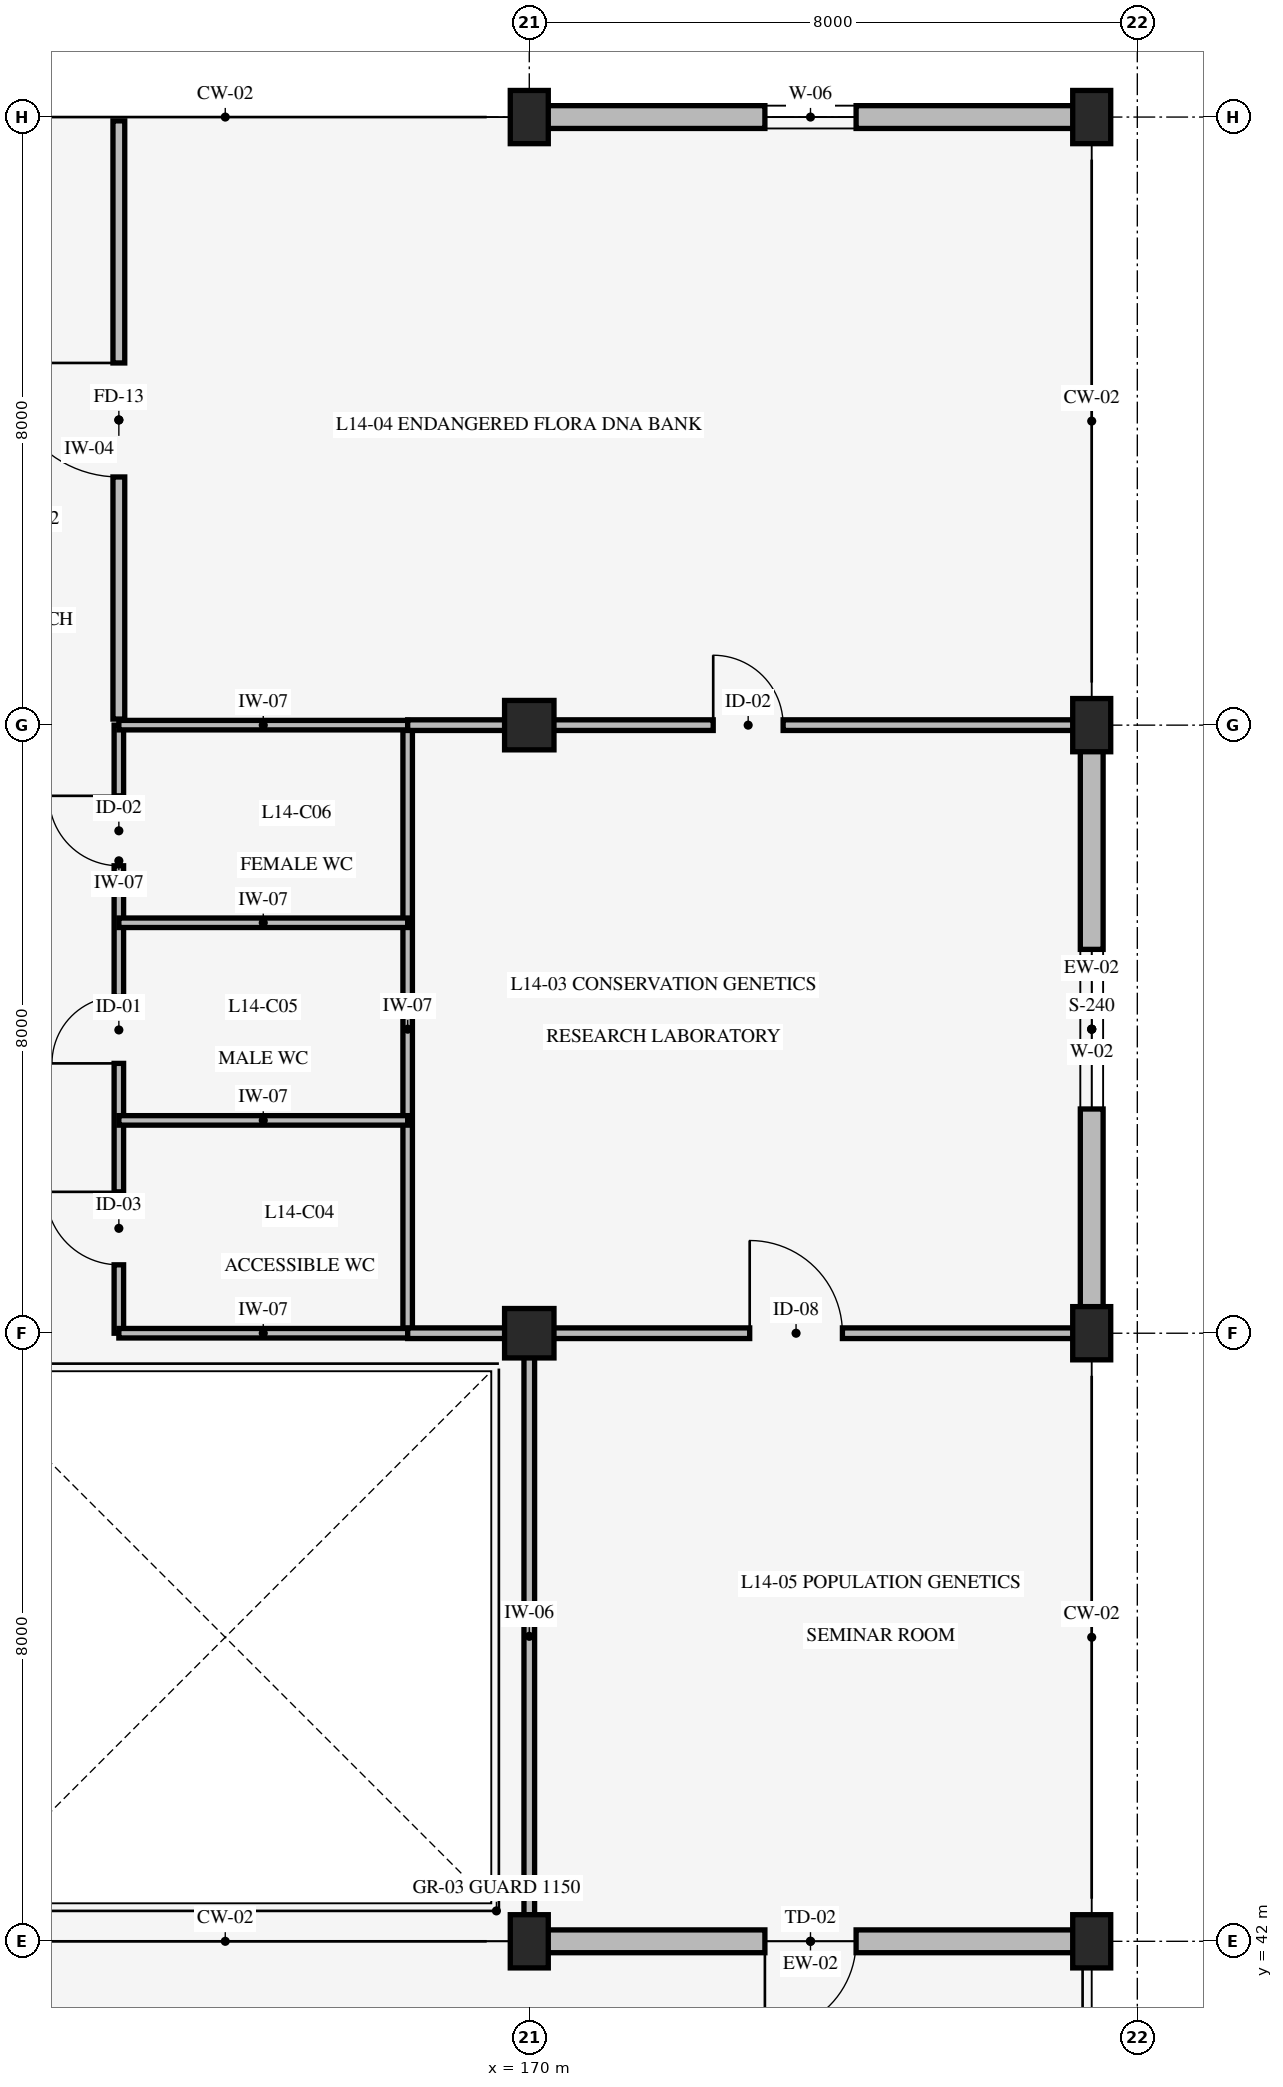
"""IFC4 building model, lengths in metres.
Left out: names, types, materials, properties, quantities, classifications, styles, units other than length and angle.
Written with IfcOpenShell. Run it as: python <this file> out.ifc"""

import sys

from ifc_helpers import new_model, si_unit, direction, frame, frame_2d, origin, origin_2d, place, context, subcontext, project, spatial, rectangle, extrude, element, fill, save


model = new_model("IFC4")
c1 = context("Model", 3, precision=1e-05, world=origin(), true_north=direction((0.0, 1.0)))
c2 = subcontext(c1, "Body", "Model", "MODEL_VIEW")
j1 = project(units=[si_unit("LENGTHUNIT", "METRE"), si_unit("PLANEANGLEUNIT", "RADIAN")], contexts=[c1])
p1 = place(None, origin())
s1 = spatial("IfcSite", under=j1, at=p1, CompositionType="ELEMENT")
p2 = place(p1, origin())
s2 = spatial("IfcBuilding", under=s1, at=p2, CompositionType="ELEMENT")
p3 = place(p2, frame((0.0, 0.0, 57.0)))
s3 = spatial("IfcBuildingStorey", under=s2, at=p3, CompositionType="ELEMENT", Elevation=57.0)
p4 = place(p3, frame((170.0, 42.0, 0.0), z_axis=(0.0, 0.0, 1.0), x_axis=(1.0, 0.0, 0.0)))
e1 = element("IfcColumn", 1, at=p4, inside=s3, PredefinedType="COLUMN", context=c2, shape_type="SweptSolid", body=[
    extrude(rectangle(XDim=0.5, YDim=0.7, at=origin_2d()), origin(), (0.0, 0.0, 1.0), 4.2),
])
for number, where, z_axis, x_axis in (
    (2, (170.0, 50.0, 0.0), (0.0, 0.0, 1.0), (1.0, 0.0, 0.0)),
    (3, (170.0, 58.0, 0.0), (0.0, 0.0, 1.0), (1.0, 0.0, 0.0)),
):
    element("IfcColumn", number, at=place(p3, frame(where, z_axis=z_axis, x_axis=x_axis)), inside=s3, PredefinedType="COLUMN", context=c2, shape_type="SweptSolid", body=[
        extrude(rectangle(XDim=0.65, YDim=0.65, at=origin_2d()), origin(), (0.0, 0.0, 1.0), 4.2),
    ])
for number, where, z_axis, x_axis in (
    (4, (170.0, 66.0, 0.0), (0.0, 0.0, 1.0), (1.0, 0.0, 0.0)),
    (5, (177.4, 42.0, 0.0), (0.0, 0.0, 1.0), (1.0, 0.0, 0.0)),
    (6, (177.4, 50.0, 0.0), (0.0, 0.0, 1.0), (1.0, 0.0, 0.0)),
    (7, (177.4, 58.0, 0.0), (0.0, 0.0, 1.0), (1.0, 0.0, 0.0)),
    (8, (177.4, 66.0, 0.0), (0.0, 0.0, 1.0), (1.0, 0.0, 0.0)),
):
    element("IfcColumn", number, at=place(p3, frame(where, z_axis=z_axis, x_axis=x_axis)), inside=s3, PredefinedType="COLUMN", context=c2, shape_type="SweptSolid", body=[
        extrude(rectangle(XDim=0.5, YDim=0.7, at=origin_2d()), origin(), (0.0, 0.0, 1.0), 4.2),
    ])
p5 = place(p3, frame((177.4, 42.0, 0.0), z_axis=(0.0, 0.0, 1.0), x_axis=(-1.0, 0.0, 0.0)))
e9 = element("IfcWall", 9, at=p5, inside=s3, PredefinedType="STANDARD", context=c2, shape_type="SweptSolid", body=[
    extrude(rectangle(XDim=7.4, YDim=0.3, at=frame_2d((3.7, 0.0))), origin(), (0.0, 0.0, 1.0), 3.29),
])
p6 = place(p5, frame((3.1, 0.0, 0.0)))
e10 = element("IfcOpeningElement", 10, at=p6, cuts=e9, PredefinedType="OPENING", context=c2, shape_type="SweptSolid", body=[
    extrude(rectangle(XDim=1.2, YDim=2.2, at=frame_2d((0.6, 1.1))), frame((0.0, 0.16, 0.0), z_axis=(0.0, -1.0, 0.0), x_axis=(1.0, 0.0, 0.0)), (0.0, 0.0, 1.0), 0.32),
])
p7 = place(p3, frame((170.0, 66.0, 0.0), z_axis=(0.0, 0.0, 1.0), x_axis=(1.0, 0.0, 0.0)))
e11 = element("IfcWall", 11, at=p7, inside=s3, PredefinedType="STANDARD", context=c2, shape_type="SweptSolid", body=[
    extrude(rectangle(XDim=7.4, YDim=0.3, at=frame_2d((3.7, 0.0))), origin(), (0.0, 0.0, 1.0), 3.29),
])
p8 = place(p7, frame((3.1, 0.0, 0.85)))
e12 = element("IfcOpeningElement", 12, at=p8, cuts=e11, PredefinedType="OPENING", context=c2, shape_type="SweptSolid", body=[
    extrude(rectangle(XDim=1.2, YDim=1.2, at=frame_2d((0.6, 0.6))), frame((0.0, 0.16, 0.0), z_axis=(0.0, -1.0, 0.0), x_axis=(1.0, 0.0, 0.0)), (0.0, 0.0, 1.0), 0.32),
])
p9 = place(p3, frame((177.4, 58.0, 0.0), z_axis=(0.0, 0.0, 1.0), x_axis=(0.0, -1.0, 0.0)))
e13 = element("IfcWall", 13, at=p9, inside=s3, PredefinedType="STANDARD", context=c2, shape_type="SweptSolid", body=[
    extrude(rectangle(XDim=8.0, YDim=0.3, at=frame_2d((4.0, 0.0))), origin(), (0.0, 0.0, 1.0), 3.34),
])
p10 = place(p9, frame((2.95, 0.0, 0.85)))
e14 = element("IfcOpeningElement", 14, at=p10, cuts=e13, PredefinedType="OPENING", context=c2, shape_type="SweptSolid", body=[
    extrude(rectangle(XDim=2.1, YDim=1.6, at=frame_2d((1.05, 0.8))), frame((0.0, 0.16, 0.0), z_axis=(0.0, -1.0, 0.0), x_axis=(1.0, 0.0, 0.0)), (0.0, 0.0, 1.0), 0.32),
])
p11 = place(p3, frame((164.6, 50.0, 0.0), z_axis=(0.0, 0.0, 1.0), x_axis=(0.0, 1.0, 0.0)))
e15 = element("IfcWall", 15, at=p11, inside=s3, PredefinedType="STANDARD", context=c2, shape_type="SweptSolid", body=[
    extrude(rectangle(XDim=8.0, YDim=0.125, at=frame_2d((4.0, 0.0))), origin(), (0.0, 0.0, 1.0), 3.9),
])
p12 = place(p11, frame((0.9, 0.0, 0.0)))
e16 = element("IfcOpeningElement", 16, at=p12, cuts=e15, PredefinedType="OPENING", context=c2, shape_type="SweptSolid", body=[
    extrude(rectangle(XDim=0.96, YDim=2.08, at=frame_2d((0.48, 1.04))), frame((0.0, 0.073, 0.0), z_axis=(0.0, -1.0, 0.0), x_axis=(1.0, 0.0, 0.0)), (0.0, 0.0, 1.0), 0.145),
])
p13 = place(p11, frame((3.55, 0.0, 0.0)))
e17 = element("IfcOpeningElement", 17, at=p13, cuts=e15, PredefinedType="OPENING", context=c2, shape_type="SweptSolid", body=[
    extrude(rectangle(XDim=0.88, YDim=2.05, at=frame_2d((0.44, 1.025))), frame((0.0, 0.073, 0.0), z_axis=(0.0, -1.0, 0.0), x_axis=(1.0, 0.0, 0.0)), (0.0, 0.0, 1.0), 0.145),
])
p14 = place(p11, frame((6.15, 0.0, 0.0)))
e18 = element("IfcOpeningElement", 18, at=p14, cuts=e15, PredefinedType="OPENING", context=c2, shape_type="SweptSolid", body=[
    extrude(rectangle(XDim=0.92, YDim=2.05, at=frame_2d((0.46, 1.025))), frame((0.0, 0.073, 0.0), z_axis=(0.0, -1.0, 0.0), x_axis=(1.0, 0.0, 0.0)), (0.0, 0.0, 1.0), 0.145),
])
p15 = place(p3, frame((168.4, 50.0, 0.0), z_axis=(0.0, 0.0, 1.0), x_axis=(0.0, 1.0, 0.0)))
e19 = element("IfcWall", 19, at=p15, inside=s3, PredefinedType="STANDARD", context=c2, shape_type="SweptSolid", body=[
    extrude(rectangle(XDim=8.0, YDim=0.125, at=frame_2d((4.0, 0.0))), origin(), (0.0, 0.0, 1.0), 3.9),
])
p16 = place(p3, frame((164.6, 50.0, 0.0), z_axis=(0.0, 0.0, 1.0), x_axis=(1.0, 0.0, 0.0)))
e20 = element("IfcWall", 20, at=p16, inside=s3, PredefinedType="STANDARD", context=c2, shape_type="SweptSolid", body=[
    extrude(rectangle(XDim=3.8, YDim=0.125, at=frame_2d((1.9, 0.0))), origin(), (0.0, 0.0, 1.0), 3.29),
])
for number, where, z_axis, x_axis in (
    (21, (164.6, 52.8, 0.0), (0.0, 0.0, 1.0), (1.0, 0.0, 0.0)),
    (22, (164.6, 55.4, 0.0), (0.0, 0.0, 1.0), (1.0, 0.0, 0.0)),
):
    element("IfcWall", number, at=place(p3, frame(where, z_axis=z_axis, x_axis=x_axis)), inside=s3, PredefinedType="STANDARD", context=c2, shape_type="SweptSolid", body=[
        extrude(rectangle(XDim=3.8, YDim=0.125, at=frame_2d((1.9, 0.0))), origin(), (0.0, 0.0, 1.0), 3.9),
    ])
p17 = place(p3, frame((164.6, 58.0, 0.0), z_axis=(0.0, 0.0, 1.0), x_axis=(1.0, 0.0, 0.0)))
e23 = element("IfcWall", 23, at=p17, inside=s3, PredefinedType="STANDARD", context=c2, shape_type="SweptSolid", body=[
    extrude(rectangle(XDim=3.8, YDim=0.125, at=frame_2d((1.9, 0.0))), origin(), (0.0, 0.0, 1.0), 3.29),
])
p18 = place(p3, frame((168.4, 58.0, 0.0), z_axis=(0.0, 0.0, 1.0), x_axis=(1.0, 0.0, 0.0)))
e24 = element("IfcWall", 24, at=p18, inside=s3, PredefinedType="STANDARD", context=c2, shape_type="SweptSolid", body=[
    extrude(rectangle(XDim=8.96, YDim=0.14, at=frame_2d((4.48, 0.0))), origin(), (0.0, 0.0, 1.0), 3.29),
])
p19 = place(p18, frame((4.02, 0.0, 0.0)))
e25 = element("IfcOpeningElement", 25, at=p19, cuts=e24, PredefinedType="OPENING", context=c2, shape_type="SweptSolid", body=[
    extrude(rectangle(XDim=0.92, YDim=2.05, at=frame_2d((0.46, 1.025))), frame((0.0, 0.08, 0.0), z_axis=(0.0, -1.0, 0.0), x_axis=(1.0, 0.0, 0.0)), (0.0, 0.0, 1.0), 0.16),
])
p20 = place(p3, frame((164.6, 58.08, 0.0), z_axis=(0.0, 0.0, 1.0), x_axis=(0.0, 1.0, 0.0)))
e26 = element("IfcWall", 26, at=p20, inside=s3, PredefinedType="STANDARD", context=c2, shape_type="SweptSolid", body=[
    extrude(rectangle(XDim=7.87, YDim=0.155, at=frame_2d((3.935, 0.0))), origin(), (0.0, 0.0, 1.0), 3.9),
])
p21 = place(p20, frame((3.185, 0.0, 0.0)))
e27 = element("IfcOpeningElement", 27, at=p21, cuts=e26, PredefinedType="OPENING", context=c2, shape_type="SweptSolid", body=[
    extrude(rectangle(XDim=1.5, YDim=2.2, at=frame_2d((0.75, 1.1))), frame((0.0, 0.087, 0.0), z_axis=(0.0, -1.0, 0.0), x_axis=(1.0, 0.0, 0.0)), (0.0, 0.0, 1.0), 0.175),
])
p22 = place(p3, frame((170.0, 42.35, 0.0), z_axis=(0.0, 0.0, 1.0), x_axis=(0.0, 1.0, 0.0)))
e28 = element("IfcWall", 28, at=p22, inside=s3, PredefinedType="STANDARD", context=c2, shape_type="SweptSolid", body=[
    extrude(rectangle(XDim=7.65, YDim=0.14, at=frame_2d((3.825, 0.0))), origin(), (0.0, 0.0, 1.0), 3.34),
])
p23 = place(p3, frame((168.4, 50.0, 0.0), z_axis=(0.0, 0.0, 1.0), x_axis=(1.0, 0.0, 0.0)))
e29 = element("IfcWall", 29, at=p23, inside=s3, PredefinedType="STANDARD", context=c2, shape_type="SweptSolid", body=[
    extrude(rectangle(XDim=8.96, YDim=0.14, at=frame_2d((4.48, 0.0))), origin(), (0.0, 0.0, 1.0), 3.29),
])
p24 = place(p23, frame((4.5, 0.0, 0.0)))
e30 = element("IfcOpeningElement", 30, at=p24, cuts=e29, PredefinedType="OPENING", context=c2, shape_type="SweptSolid", body=[
    extrude(rectangle(XDim=1.22, YDim=2.14, at=frame_2d((0.61, 1.07))), frame((0.0, 0.08, 0.0), z_axis=(0.0, -1.0, 0.0), x_axis=(1.0, 0.0, 0.0)), (0.0, 0.0, 1.0), 0.16),
])
p25 = place(p6, origin())
e31 = element("IfcDoor", 31, at=p25, inside=s3, OperationType="SINGLE_SWING_RIGHT", PredefinedType="DOOR", context=c2, shape_type="SweptSolid", body=[
    extrude(rectangle(XDim=1.2, YDim=2.2, at=frame_2d((0.6, 1.1))), frame((0.0, 0.025, 0.0), z_axis=(0.0, -1.0, 0.0), x_axis=(1.0, 0.0, 0.0)), (0.0, 0.0, 1.0), 0.05),
])
fill(e10, e31)
p26 = place(p8, origin())
e32 = element("IfcWindow", 32, at=p26, inside=s3, PartitioningType="SINGLE_PANEL", PredefinedType="WINDOW", context=c2, shape_type="SweptSolid", body=[
    extrude(rectangle(XDim=1.2, YDim=1.2, at=frame_2d((0.6, 0.6))), frame((0.0, 0.03, 0.0), z_axis=(0.0, -1.0, 0.0), x_axis=(1.0, 0.0, 0.0)), (0.0, 0.0, 1.0), 0.06),
])
fill(e12, e32)
p27 = place(p10, origin())
e33 = element("IfcWindow", 33, at=p27, inside=s3, PartitioningType="SINGLE_PANEL", PredefinedType="WINDOW", context=c2, shape_type="SweptSolid", body=[
    extrude(rectangle(XDim=2.1, YDim=1.6, at=frame_2d((1.05, 0.8))), frame((0.0, 0.03, 0.0), z_axis=(0.0, -1.0, 0.0), x_axis=(1.0, 0.0, 0.0)), (0.0, 0.0, 1.0), 0.06),
])
fill(e14, e33)
p28 = place(p12, origin())
e34 = element("IfcDoor", 34, at=p28, inside=s3, OperationType="SINGLE_SWING_RIGHT", PredefinedType="DOOR", context=c2, shape_type="SweptSolid", body=[
    extrude(rectangle(XDim=0.96, YDim=2.08, at=frame_2d((0.48, 1.04))), frame((0.0, 0.025, 0.0), z_axis=(0.0, -1.0, 0.0), x_axis=(1.0, 0.0, 0.0)), (0.0, 0.0, 1.0), 0.05),
])
fill(e16, e34)
p29 = place(p13, origin())
e35 = element("IfcDoor", 35, at=p29, inside=s3, OperationType="SINGLE_SWING_LEFT", PredefinedType="DOOR", context=c2, shape_type="SweptSolid", body=[
    extrude(rectangle(XDim=0.88, YDim=2.05, at=frame_2d((0.44, 1.025))), frame((0.0, 0.025, 0.0), z_axis=(0.0, -1.0, 0.0), x_axis=(1.0, 0.0, 0.0)), (0.0, 0.0, 1.0), 0.05),
])
fill(e17, e35)
p30 = place(p14, origin())
e36 = element("IfcDoor", 36, at=p30, inside=s3, OperationType="SINGLE_SWING_RIGHT", PredefinedType="DOOR", context=c2, shape_type="SweptSolid", body=[
    extrude(rectangle(XDim=0.92, YDim=2.05, at=frame_2d((0.46, 1.025))), frame((0.0, 0.025, 0.0), z_axis=(0.0, -1.0, 0.0), x_axis=(1.0, 0.0, 0.0)), (0.0, 0.0, 1.0), 0.05),
])
fill(e18, e36)
p31 = place(p19, origin())
e37 = element("IfcDoor", 37, at=p31, inside=s3, OperationType="SINGLE_SWING_LEFT", PredefinedType="DOOR", context=c2, shape_type="SweptSolid", body=[
    extrude(rectangle(XDim=0.92, YDim=2.05, at=frame_2d((0.46, 1.025))), frame((0.0, 0.025, 0.0), z_axis=(0.0, -1.0, 0.0), x_axis=(1.0, 0.0, 0.0)), (0.0, 0.0, 1.0), 0.05),
])
fill(e25, e37)
p32 = place(p21, origin())
e38 = element("IfcDoor", 38, at=p32, inside=s3, OperationType="SINGLE_SWING_RIGHT", PredefinedType="DOOR", context=c2, shape_type="SweptSolid", body=[
    extrude(rectangle(XDim=1.5, YDim=2.2, at=frame_2d((0.75, 1.1))), frame((0.0, 0.025, 0.0), z_axis=(0.0, -1.0, 0.0), x_axis=(1.0, 0.0, 0.0)), (0.0, 0.0, 1.0), 0.05),
])
fill(e27, e38)
p33 = place(p24, origin())
e39 = element("IfcDoor", 39, at=p33, inside=s3, OperationType="SINGLE_SWING_LEFT", PredefinedType="DOOR", context=c2, shape_type="SweptSolid", body=[
    extrude(rectangle(XDim=1.22, YDim=2.14, at=frame_2d((0.61, 1.07))), frame((0.0, 0.025, 0.0), z_axis=(0.0, -1.0, 0.0), x_axis=(1.0, 0.0, 0.0)), (0.0, 0.0, 1.0), 0.05),
])
fill(e30, e39)
save(model, sys.argv[1])
